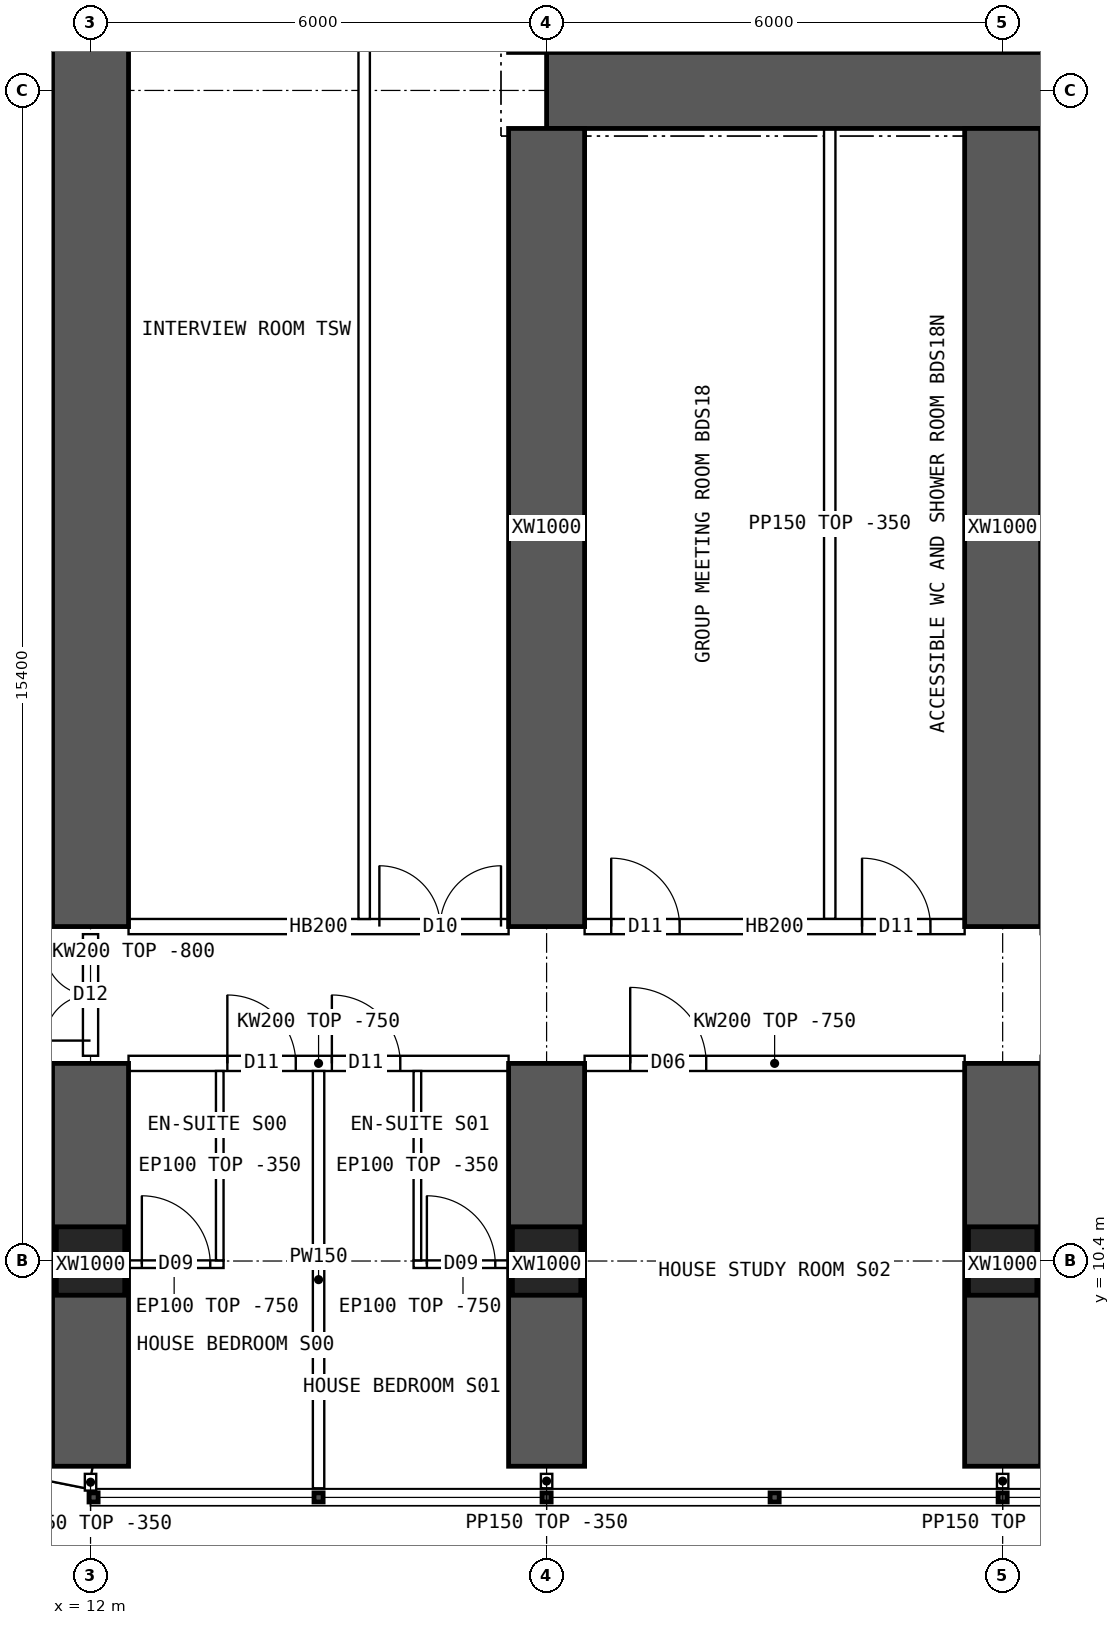
"""IFC4 building model, lengths in metres.
Left out: names, types, materials, properties, quantities, classifications, styles, units other than length and angle.
Written with IfcOpenShell. Run it as: python <this file> out.ifc"""

import sys

from ifc_helpers import new_model, si_unit, direction, frame, frame_2d, origin, origin_2d, place, context, subcontext, project, spatial, polyline, rectangle, hollow_rectangle, outline, extrude, element, fill, save


model = new_model("IFC4")
c1 = context("Model", 3, precision=1e-05, world=origin(), true_north=direction((0.0, 1.0)))
c2 = subcontext(c1, "Body", "Model", "MODEL_VIEW")
j1 = project(units=[si_unit("LENGTHUNIT", "METRE"), si_unit("PLANEANGLEUNIT", "RADIAN")], contexts=[c1])
p1 = place(None, origin())
s1 = spatial("IfcSite", under=j1, at=p1, CompositionType="ELEMENT")
p2 = place(p1, origin())
s2 = spatial("IfcBuilding", under=s1, at=p2, CompositionType="ELEMENT")
p3 = place(p2, frame((0.0, 0.0, 65.2)))
s3 = spatial("IfcBuildingStorey", under=s2, at=p3, CompositionType="ELEMENT", Elevation=65.2)
for number, where, z_axis, x_axis in (
    (1, (12.0, 10.4, 0.0), (0.0, 0.0, 1.0), (1.0, 0.0, 0.0)),
    (2, (18.0, 10.4, 0.0), (0.0, 0.0, 1.0), (1.0, 0.0, 0.0)),
    (3, (24.0, 10.4, 0.0), (0.0, 0.0, 1.0), (1.0, 0.0, 0.0)),
):
    element("IfcColumn", number, at=place(p3, frame(where, z_axis=z_axis, x_axis=x_axis)), inside=s3, PredefinedType="COLUMN", context=c2, shape_type="SweptSolid", body=[
        extrude(hollow_rectangle(XDim=0.9, YDim=0.9, WallThickness=0.09, at=origin_2d()), origin(), (0.0, 0.0, 1.0), 3.75),
    ])
p4 = place(p3, frame((18.0, 25.8, 0.0), z_axis=(0.0, 0.0, 1.0), x_axis=(1.0, 0.0, 0.0)))
e4 = element("IfcWall", 4, at=p4, inside=s3, PredefinedType="SHEAR", context=c2, shape_type="SweptSolid", body=[
    extrude(rectangle(XDim=48.0, YDim=1.0, at=frame_2d((24.0, 0.0))), origin(), (0.0, 0.0, 1.0), 3.75),
])
p5 = place(p3, frame((12.0, 7.7, 0.0), z_axis=(0.0, 0.0, 1.0), x_axis=(0.0, 1.0, 0.0)))
e5 = element("IfcWall", 5, at=p5, inside=s3, PredefinedType="SHEAR", context=c2, shape_type="SweptSolid", body=[
    extrude(rectangle(XDim=5.3, YDim=1.0, at=frame_2d((2.65, 0.0))), origin(), (0.0, 0.0, 1.0), 3.75),
])
p6 = place(p3, frame((12.0, 14.8, 0.0), z_axis=(0.0, 0.0, 1.0), x_axis=(0.0, 1.0, 0.0)))
e6 = element("IfcWall", 6, at=p6, inside=s3, PredefinedType="SHEAR", context=c2, shape_type="SweptSolid", body=[
    extrude(rectangle(XDim=34.4, YDim=1.0, at=frame_2d((17.2, 0.0))), origin(), (0.0, 0.0, 1.0), 3.75),
])
p7 = place(p3, frame((18.0, 7.7, 0.0), z_axis=(0.0, 0.0, 1.0), x_axis=(0.0, 1.0, 0.0)))
e7 = element("IfcWall", 7, at=p7, inside=s3, PredefinedType="SHEAR", context=c2, shape_type="SweptSolid", body=[
    extrude(rectangle(XDim=5.3, YDim=1.0, at=frame_2d((2.65, 0.0))), origin(), (0.0, 0.0, 1.0), 3.75),
])
p8 = place(p3, frame((18.0, 14.8, 0.0), z_axis=(0.0, 0.0, 1.0), x_axis=(0.0, 1.0, 0.0)))
e8 = element("IfcWall", 8, at=p8, inside=s3, PredefinedType="SHEAR", context=c2, shape_type="SweptSolid", body=[
    extrude(rectangle(XDim=10.5, YDim=1.0, at=frame_2d((5.25, 0.0))), origin(), (0.0, 0.0, 1.0), 3.75),
])
p9 = place(p3, frame((24.0, 7.7, 0.0), z_axis=(0.0, 0.0, 1.0), x_axis=(0.0, 1.0, 0.0)))
e9 = element("IfcWall", 9, at=p9, inside=s3, PredefinedType="SHEAR", context=c2, shape_type="SweptSolid", body=[
    extrude(rectangle(XDim=5.3, YDim=1.0, at=frame_2d((2.65, 0.0))), origin(), (0.0, 0.0, 1.0), 3.75),
])
p10 = place(p3, frame((24.0, 14.8, 0.0), z_axis=(0.0, 0.0, 1.0), x_axis=(0.0, 1.0, 0.0)))
e10 = element("IfcWall", 10, at=p10, inside=s3, PredefinedType="SHEAR", context=c2, shape_type="SweptSolid", body=[
    extrude(rectangle(XDim=10.5, YDim=1.0, at=frame_2d((5.25, 0.0))), origin(), (0.0, 0.0, 1.0), 3.75),
])
p11 = place(p3, frame((8.843, 8.178, 0.0), z_axis=(0.0, 0.0, 1.0), x_axis=(0.980787251524, -0.195080412259, 0.0)))
e11 = element("IfcWall", 11, at=p11, inside=s3, PredefinedType="SOLIDWALL", context=c2, shape_type="SweptSolid", body=[
    extrude(outline(polyline([(-0.03, -0.15), (3.249, -0.15), (3.189, 0.15), (0.03, 0.15), (-0.03, -0.15)])), origin(), (0.0, 0.0, 1.0), 3.4),
])
p12 = place(p11, frame((0.909, 0.0, 0.9)))
e12 = element("IfcOpeningElement", 12, at=p12, cuts=e11, PredefinedType="OPENING", context=c2, shape_type="SweptSolid", body=[
    extrude(rectangle(XDim=1.4, YDim=1.8, at=frame_2d((0.7, 0.9))), frame((0.0, 0.16, 0.0), z_axis=(0.0, -1.0, 0.0), x_axis=(1.0, 0.0, 0.0)), (0.0, 0.0, 1.0), 0.32),
])
p13 = place(p3, frame((12.5, 13.0, 0.0), z_axis=(0.0, 0.0, 1.0), x_axis=(1.0, 0.0, 0.0)))
e13 = element("IfcWall", 13, at=p13, inside=s3, PredefinedType="SOLIDWALL", context=c2, shape_type="SweptSolid", body=[
    extrude(outline(polyline([(0.0, 0.0), (5.0, 0.0), (5.0, 3.0), (0.0, 3.0), (0.0, 0.0)])), frame((0.0, 0.1, 0.0), z_axis=(0.0, -1.0, 0.0), x_axis=(1.0, 0.0, 0.0)), (0.0, 0.0, 1.0), 0.2),
])
p14 = place(p13, frame((1.3, 0.0, 0.0)))
e14 = element("IfcOpeningElement", 14, at=p14, cuts=e13, PredefinedType="OPENING", context=c2, shape_type="SweptSolid", body=[
    extrude(rectangle(XDim=0.9, YDim=2.1, at=frame_2d((0.45, 1.05))), frame((0.0, 0.11, 0.0), z_axis=(0.0, -1.0, 0.0), x_axis=(1.0, 0.0, 0.0)), (0.0, 0.0, 1.0), 0.22),
])
p15 = place(p13, frame((2.675, 0.0, 0.0)))
e15 = element("IfcOpeningElement", 15, at=p15, cuts=e13, PredefinedType="OPENING", context=c2, shape_type="SweptSolid", body=[
    extrude(rectangle(XDim=0.9, YDim=2.1, at=frame_2d((0.45, 1.05))), frame((0.0, 0.11, 0.0), z_axis=(0.0, -1.0, 0.0), x_axis=(1.0, 0.0, 0.0)), (0.0, 0.0, 1.0), 0.22),
])
p16 = place(p3, frame((12.5, 14.8, 0.0), z_axis=(0.0, 0.0, 1.0), x_axis=(1.0, 0.0, 0.0)))
e16 = element("IfcWall", 16, at=p16, inside=s3, PredefinedType="SOLIDWALL", context=c2, shape_type="SweptSolid", body=[
    extrude(rectangle(XDim=5.0, YDim=0.2, at=frame_2d((2.5, 0.0))), origin(), (0.0, 0.0, 1.0), 3.4),
])
p17 = place(p16, frame((3.3, 0.0, 0.0)))
e17 = element("IfcOpeningElement", 17, at=p17, cuts=e16, PredefinedType="OPENING", context=c2, shape_type="SweptSolid", body=[
    extrude(rectangle(XDim=1.6, YDim=2.1, at=frame_2d((0.8, 1.05))), frame((0.0, 0.11, 0.0), z_axis=(0.0, -1.0, 0.0), x_axis=(1.0, 0.0, 0.0)), (0.0, 0.0, 1.0), 0.22),
])
p18 = place(p3, frame((18.5, 13.0, 0.0), z_axis=(0.0, 0.0, 1.0), x_axis=(1.0, 0.0, 0.0)))
e18 = element("IfcWall", 18, at=p18, inside=s3, PredefinedType="SOLIDWALL", context=c2, shape_type="SweptSolid", body=[
    extrude(outline(polyline([(0.0, 0.0), (5.0, 0.0), (5.0, 3.0), (0.0, 3.0), (0.0, 0.0)])), frame((0.0, 0.1, 0.0), z_axis=(0.0, -1.0, 0.0), x_axis=(1.0, 0.0, 0.0)), (0.0, 0.0, 1.0), 0.2),
])
p19 = place(p18, frame((0.6, 0.0, 0.0)))
e19 = element("IfcOpeningElement", 19, at=p19, cuts=e18, PredefinedType="OPENING", context=c2, shape_type="SweptSolid", body=[
    extrude(rectangle(XDim=1.0, YDim=2.1, at=frame_2d((0.5, 1.05))), frame((0.0, 0.11, 0.0), z_axis=(0.0, -1.0, 0.0), x_axis=(1.0, 0.0, 0.0)), (0.0, 0.0, 1.0), 0.22),
])
p20 = place(p3, frame((18.5, 14.8, 0.0), z_axis=(0.0, 0.0, 1.0), x_axis=(1.0, 0.0, 0.0)))
e20 = element("IfcWall", 20, at=p20, inside=s3, PredefinedType="SOLIDWALL", context=c2, shape_type="SweptSolid", body=[
    extrude(rectangle(XDim=5.0, YDim=0.2, at=frame_2d((2.5, 0.0))), origin(), (0.0, 0.0, 1.0), 3.4),
])
p21 = place(p20, frame((0.35, 0.0, 0.0)))
e21 = element("IfcOpeningElement", 21, at=p21, cuts=e20, PredefinedType="OPENING", context=c2, shape_type="SweptSolid", body=[
    extrude(rectangle(XDim=0.9, YDim=2.1, at=frame_2d((0.45, 1.05))), frame((0.0, 0.11, 0.0), z_axis=(0.0, -1.0, 0.0), x_axis=(1.0, 0.0, 0.0)), (0.0, 0.0, 1.0), 0.22),
])
p22 = place(p20, frame((3.65, 0.0, 0.0)))
e22 = element("IfcOpeningElement", 22, at=p22, cuts=e20, PredefinedType="OPENING", context=c2, shape_type="SweptSolid", body=[
    extrude(rectangle(XDim=0.9, YDim=2.1, at=frame_2d((0.45, 1.05))), frame((0.0, 0.11, 0.0), z_axis=(0.0, -1.0, 0.0), x_axis=(1.0, 0.0, 0.0)), (0.0, 0.0, 1.0), 0.22),
])
p23 = place(p3, frame((15.0, 7.41, 0.0), z_axis=(0.0, 0.0, 1.0), x_axis=(0.0, 1.0, 0.0)))
e23 = element("IfcWall", 23, at=p23, inside=s3, PredefinedType="PARTITIONING", context=c2, shape_type="SweptSolid", body=[
    extrude(outline(polyline([(0.0, 0.0), (5.49, 0.0), (5.49, 3.0), (5.442, 3.0), (5.44, 3.4), (3.192, 3.4), (3.19, 3.0), (2.792, 3.0), (2.79, 3.4), (0.0, 3.4), (0.0, 0.0)])), frame((0.0, 0.075, 0.0), z_axis=(0.0, -1.0, 0.0), x_axis=(1.0, 0.0, 0.0)), (0.0, 0.0, 1.0), 0.15),
])
p24 = place(p3, frame((13.75, 10.358, 0.0), z_axis=(0.0, 0.0, 1.0), x_axis=(-1.0, 0.0, 0.0)))
e24 = element("IfcWall", 24, at=p24, inside=s3, PredefinedType="PARTITIONING", context=c2, shape_type="SweptSolid", body=[
    extrude(outline(polyline([(0.0, 0.0), (1.3, 0.0), (1.3, 3.0), (0.0, 3.0), (0.0, 0.0)])), frame((0.0, 0.05, 0.0), z_axis=(0.0, -1.0, 0.0), x_axis=(1.0, 0.0, 0.0)), (0.0, 0.0, 1.0), 0.1),
])
p25 = place(p24, frame((0.175, 0.0, 0.0)))
e25 = element("IfcOpeningElement", 25, at=p25, cuts=e24, PredefinedType="OPENING", context=c2, shape_type="SweptSolid", body=[
    extrude(rectangle(XDim=0.9, YDim=2.1, at=frame_2d((0.45, 1.05))), frame((0.0, 0.06, 0.0), z_axis=(0.0, -1.0, 0.0), x_axis=(1.0, 0.0, 0.0)), (0.0, 0.0, 1.0), 0.12),
])
p26 = place(p3, frame((13.7, 10.408, 0.0), z_axis=(0.0, 0.0, 1.0), x_axis=(0.0, 1.0, 0.0)))
e26 = element("IfcWall", 26, at=p26, inside=s3, PredefinedType="PARTITIONING", context=c2, shape_type="SweptSolid", body=[
    extrude(outline(polyline([(0.0, 0.0), (2.492, 0.0), (2.492, 3.0), (2.444, 3.0), (2.442, 3.4), (0.194, 3.4), (0.192, 3.0), (0.0, 3.0), (0.0, 0.0)])), frame((0.0, 0.05, 0.0), z_axis=(0.0, -1.0, 0.0), x_axis=(1.0, 0.0, 0.0)), (0.0, 0.0, 1.0), 0.1),
])
p27 = place(p3, frame((17.55, 10.358, 0.0), z_axis=(0.0, 0.0, 1.0), x_axis=(-1.0, 0.0, 0.0)))
e27 = element("IfcWall", 27, at=p27, inside=s3, PredefinedType="PARTITIONING", context=c2, shape_type="SweptSolid", body=[
    extrude(outline(polyline([(0.0, 0.0), (1.3, 0.0), (1.3, 3.0), (0.0, 3.0), (0.0, 0.0)])), frame((0.0, 0.05, 0.0), z_axis=(0.0, -1.0, 0.0), x_axis=(1.0, 0.0, 0.0)), (0.0, 0.0, 1.0), 0.1),
])
p28 = place(p27, frame((0.225, 0.0, 0.0)))
e28 = element("IfcOpeningElement", 28, at=p28, cuts=e27, PredefinedType="OPENING", context=c2, shape_type="SweptSolid", body=[
    extrude(rectangle(XDim=0.9, YDim=2.1, at=frame_2d((0.45, 1.05))), frame((0.0, 0.06, 0.0), z_axis=(0.0, -1.0, 0.0), x_axis=(1.0, 0.0, 0.0)), (0.0, 0.0, 1.0), 0.12),
])
p29 = place(p3, frame((16.3, 10.408, 0.0), z_axis=(0.0, 0.0, 1.0), x_axis=(0.0, 1.0, 0.0)))
e29 = element("IfcWall", 29, at=p29, inside=s3, PredefinedType="PARTITIONING", context=c2, shape_type="SweptSolid", body=[
    extrude(outline(polyline([(0.0, 0.0), (2.492, 0.0), (2.492, 3.0), (2.444, 3.0), (2.442, 3.4), (0.194, 3.4), (0.192, 3.0), (0.0, 3.0), (0.0, 0.0)])), frame((0.0, 0.05, 0.0), z_axis=(0.0, -1.0, 0.0), x_axis=(1.0, 0.0, 0.0)), (0.0, 0.0, 1.0), 0.1),
])
p30 = place(p3, frame((25.75, 10.358, 0.0), z_axis=(0.0, 0.0, 1.0), x_axis=(-1.0, 0.0, 0.0)))
e30 = element("IfcWall", 30, at=p30, inside=s3, PredefinedType="PARTITIONING", context=c2, shape_type="SweptSolid", body=[
    extrude(outline(polyline([(0.0, 0.0), (1.3, 0.0), (1.3, 3.0), (0.0, 3.0), (0.0, 0.0)])), frame((0.0, 0.05, 0.0), z_axis=(0.0, -1.0, 0.0), x_axis=(1.0, 0.0, 0.0)), (0.0, 0.0, 1.0), 0.1),
])
p31 = place(p30, frame((0.175, 0.0, 0.0)))
e31 = element("IfcOpeningElement", 31, at=p31, cuts=e30, PredefinedType="OPENING", context=c2, shape_type="SweptSolid", body=[
    extrude(rectangle(XDim=0.9, YDim=2.1, at=frame_2d((0.45, 1.05))), frame((0.0, 0.06, 0.0), z_axis=(0.0, -1.0, 0.0), x_axis=(1.0, 0.0, 0.0)), (0.0, 0.0, 1.0), 0.12),
])
p32 = place(p3, frame((21.725, 14.9, 0.0), z_axis=(0.0, 0.0, 1.0), x_axis=(0.0, 1.0, 0.0)))
e32 = element("IfcWall", 32, at=p32, inside=s3, PredefinedType="PARTITIONING", context=c2, shape_type="SweptSolid", body=[
    extrude(rectangle(XDim=10.4, YDim=0.15, at=frame_2d((5.2, 0.0))), origin(), (0.0, 0.0, 1.0), 3.4),
])
p33 = place(p3, frame((15.6, 14.9, 0.0), z_axis=(0.0, 0.0, 1.0), x_axis=(0.0, 1.0, 0.0)))
e33 = element("IfcWall", 33, at=p33, inside=s3, PredefinedType="PARTITIONING", context=c2, shape_type="SweptSolid", body=[
    extrude(rectangle(XDim=34.2, YDim=0.15, at=frame_2d((17.1, 0.0))), origin(), (0.0, 0.0, 1.0), 3.4),
])
p34 = place(p33, frame((13.5, 0.0, 0.0)))
e34 = element("IfcOpeningElement", 34, at=p34, cuts=e33, PredefinedType="OPENING", context=c2, shape_type="SweptSolid", body=[
    extrude(rectangle(XDim=1.0, YDim=2.1, at=frame_2d((0.5, 1.05))), frame((0.0, 0.085, 0.0), z_axis=(0.0, -1.0, 0.0), x_axis=(1.0, 0.0, 0.0)), (0.0, 0.0, 1.0), 0.17),
])
p35 = place(p33, frame((16.5, 0.0, 0.0)))
e35 = element("IfcOpeningElement", 35, at=p35, cuts=e33, PredefinedType="OPENING", context=c2, shape_type="SweptSolid", body=[
    extrude(rectangle(XDim=1.0, YDim=2.1, at=frame_2d((0.5, 1.05))), frame((0.0, 0.085, 0.0), z_axis=(0.0, -1.0, 0.0), x_axis=(1.0, 0.0, 0.0)), (0.0, 0.0, 1.0), 0.17),
])
p36 = place(p3, frame((12.0, 13.1, 0.0), z_axis=(0.0, 0.0, 1.0), x_axis=(0.0, 1.0, 0.0)))
e36 = element("IfcWall", 36, at=p36, inside=s3, PredefinedType="SOLIDWALL", context=c2, shape_type="SweptSolid", body=[
    extrude(outline(polyline([(0.0, 0.0), (1.6, 0.0), (1.6, 2.95), (0.0, 2.95), (0.0, 0.0)])), frame((0.0, 0.1, 0.0), z_axis=(0.0, -1.0, 0.0), x_axis=(1.0, 0.0, 0.0)), (0.0, 0.0, 1.0), 0.2),
])
p37 = place(p36, frame((0.2, 0.0, 0.0)))
e37 = element("IfcOpeningElement", 37, at=p37, cuts=e36, PredefinedType="OPENING", context=c2, shape_type="SweptSolid", body=[
    extrude(rectangle(XDim=1.2, YDim=2.1, at=frame_2d((0.6, 1.05))), frame((0.0, 0.11, 0.0), z_axis=(0.0, -1.0, 0.0), x_axis=(1.0, 0.0, 0.0)), (0.0, 0.0, 1.0), 0.22),
])
p38 = place(p3, frame((12.0, 7.6, 0.0), z_axis=(0.0, 0.0, 1.0), x_axis=(0.0, -1.0, 0.0)))
e38 = element("IfcWall", 38, at=p38, inside=s3, PredefinedType="PARTITIONING", context=c2, shape_type="SweptSolid", body=[
    extrude(rectangle(XDim=0.22, YDim=0.15, at=frame_2d((0.11, 0.0))), origin(), (0.0, 0.0, 1.0), 3.4),
])
for number, where, z_axis, x_axis in (
    (39, (18.0, 7.6, 0.0), (0.0, 0.0, 1.0), (0.0, -1.0, 0.0)),
    (40, (24.0, 7.6, 0.0), (0.0, 0.0, 1.0), (0.0, -1.0, 0.0)),
):
    element("IfcWall", number, at=place(p3, frame(where, z_axis=z_axis, x_axis=x_axis)), inside=s3, PredefinedType="PARTITIONING", context=c2, shape_type="SweptSolid", body=[
        extrude(rectangle(XDim=0.19, YDim=0.15, at=frame_2d((0.095, 0.0))), origin(), (0.0, 0.0, 1.0), 3.4),
    ])
p39 = place(p17, origin())
e41 = element("IfcDoor", 41, at=p39, inside=s3, OperationType="DOUBLE_DOOR_SINGLE_SWING", PredefinedType="DOOR", context=c2, shape_type="SweptSolid", body=[
    extrude(rectangle(XDim=1.6, YDim=2.1, at=frame_2d((0.8, 1.05))), frame((0.0, 0.025, 0.0), z_axis=(0.0, -1.0, 0.0), x_axis=(1.0, 0.0, 0.0)), (0.0, 0.0, 1.0), 0.05),
])
fill(e17, e41)
p40 = place(p25, origin())
e42 = element("IfcDoor", 42, at=p40, inside=s3, OperationType="SINGLE_SWING_RIGHT", PredefinedType="DOOR", context=c2, shape_type="SweptSolid", body=[
    extrude(rectangle(XDim=0.9, YDim=2.1, at=frame_2d((0.45, 1.05))), frame((0.0, 0.025, 0.0), z_axis=(0.0, -1.0, 0.0), x_axis=(1.0, 0.0, 0.0)), (0.0, 0.0, 1.0), 0.05),
])
fill(e25, e42)
p41 = place(p14, origin())
e43 = element("IfcDoor", 43, at=p41, inside=s3, OperationType="SINGLE_SWING_LEFT", PredefinedType="DOOR", context=c2, shape_type="SweptSolid", body=[
    extrude(rectangle(XDim=0.9, YDim=2.1, at=frame_2d((0.45, 1.05))), frame((0.0, 0.025, 0.0), z_axis=(0.0, -1.0, 0.0), x_axis=(1.0, 0.0, 0.0)), (0.0, 0.0, 1.0), 0.05),
])
fill(e14, e43)
p42 = place(p28, origin())
e44 = element("IfcDoor", 44, at=p42, inside=s3, OperationType="SINGLE_SWING_RIGHT", PredefinedType="DOOR", context=c2, shape_type="SweptSolid", body=[
    extrude(rectangle(XDim=0.9, YDim=2.1, at=frame_2d((0.45, 1.05))), frame((0.0, 0.025, 0.0), z_axis=(0.0, -1.0, 0.0), x_axis=(1.0, 0.0, 0.0)), (0.0, 0.0, 1.0), 0.05),
])
fill(e28, e44)
p43 = place(p15, origin())
e45 = element("IfcDoor", 45, at=p43, inside=s3, OperationType="SINGLE_SWING_LEFT", PredefinedType="DOOR", context=c2, shape_type="SweptSolid", body=[
    extrude(rectangle(XDim=0.9, YDim=2.1, at=frame_2d((0.45, 1.05))), frame((0.0, 0.025, 0.0), z_axis=(0.0, -1.0, 0.0), x_axis=(1.0, 0.0, 0.0)), (0.0, 0.0, 1.0), 0.05),
])
fill(e15, e45)
p44 = place(p19, origin())
e46 = element("IfcDoor", 46, at=p44, inside=s3, OperationType="SINGLE_SWING_LEFT", PredefinedType="DOOR", context=c2, shape_type="SweptSolid", body=[
    extrude(rectangle(XDim=1.0, YDim=2.1, at=frame_2d((0.5, 1.05))), frame((0.0, 0.025, 0.0), z_axis=(0.0, -1.0, 0.0), x_axis=(1.0, 0.0, 0.0)), (0.0, 0.0, 1.0), 0.05),
])
fill(e19, e46)
p45 = place(p21, origin())
e47 = element("IfcDoor", 47, at=p45, inside=s3, OperationType="SINGLE_SWING_LEFT", PredefinedType="DOOR", context=c2, shape_type="SweptSolid", body=[
    extrude(rectangle(XDim=0.9, YDim=2.1, at=frame_2d((0.45, 1.05))), frame((0.0, 0.025, 0.0), z_axis=(0.0, -1.0, 0.0), x_axis=(1.0, 0.0, 0.0)), (0.0, 0.0, 1.0), 0.05),
])
fill(e21, e47)
p46 = place(p22, origin())
e48 = element("IfcDoor", 48, at=p46, inside=s3, OperationType="SINGLE_SWING_LEFT", PredefinedType="DOOR", context=c2, shape_type="SweptSolid", body=[
    extrude(rectangle(XDim=0.9, YDim=2.1, at=frame_2d((0.45, 1.05))), frame((0.0, 0.025, 0.0), z_axis=(0.0, -1.0, 0.0), x_axis=(1.0, 0.0, 0.0)), (0.0, 0.0, 1.0), 0.05),
])
fill(e22, e48)
p47 = place(p37, origin())
e49 = element("IfcDoor", 49, at=p47, inside=s3, OperationType="DOUBLE_DOOR_SINGLE_SWING", PredefinedType="DOOR", context=c2, shape_type="SweptSolid", body=[
    extrude(rectangle(XDim=1.2, YDim=2.1, at=frame_2d((0.6, 1.05))), frame((0.0, 0.025, 0.0), z_axis=(0.0, -1.0, 0.0), x_axis=(1.0, 0.0, 0.0)), (0.0, 0.0, 1.0), 0.05),
])
fill(e37, e49)
save(model, sys.argv[1])
